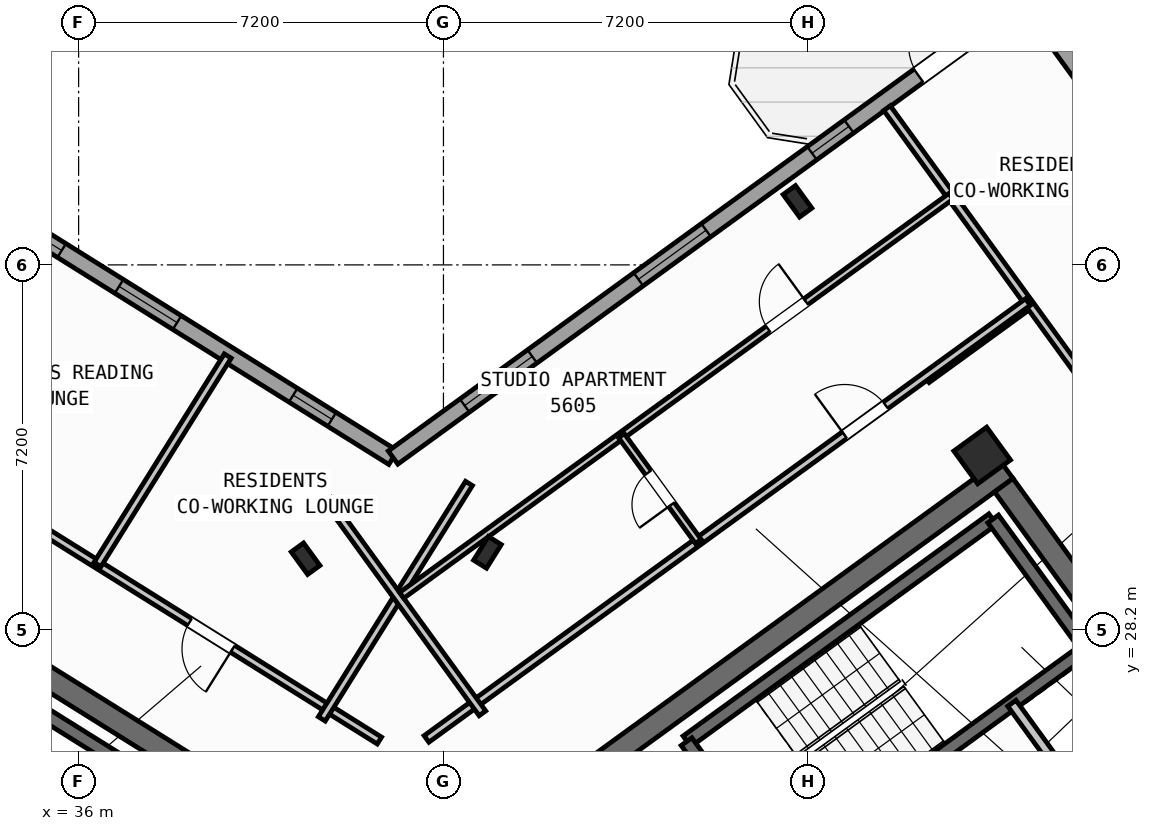
"""IFC4 building model, lengths in metres.
Left out: names, types, materials, properties, quantities, classifications, styles, units other than length and angle.
Written with IfcOpenShell. Run it as: python <this file> out.ifc"""

import sys

from ifc_helpers import new_model, si_unit, direction, frame, frame_2d, origin, origin_2d, place, context, subcontext, project, spatial, rectangle, hollow_rectangle, i_section, extrude, source, transform, mapped, element, fill, save


model = new_model("IFC4")
c1 = context("Model", 3, precision=1e-05, world=origin(), true_north=direction((0.0, 1.0)))
c2 = subcontext(c1, "Body", "Model", "MODEL_VIEW")
j1 = project(units=[si_unit("LENGTHUNIT", "METRE"), si_unit("PLANEANGLEUNIT", "RADIAN")], contexts=[c1])
p1 = place(None, origin())
s1 = spatial("IfcSite", under=j1, at=p1, CompositionType="ELEMENT")
p2 = place(p1, origin())
s2 = spatial("IfcBuilding", under=s1, at=p2, CompositionType="ELEMENT")
p3 = place(p2, frame((0.0, 0.0, 222.0)))
s3 = spatial("IfcBuildingStorey", under=s2, at=p3, CompositionType="ELEMENT", Elevation=222.0)
p4 = place(p3, frame((40.531, 24.036, 0.0), z_axis=(0.0, 0.0, 1.0), x_axis=(-0.848048787466, 0.529918157905, 0.0)))
e1 = element("IfcWall", 1, at=p4, inside=s3, PredefinedType="SHEAR", context=c2, shape_type="SweptSolid", body=[
    extrude(rectangle(XDim=13.04, YDim=0.45, at=frame_2d((6.52, 0.0))), origin(), (0.0, 0.0, 1.0), 3.35),
])
p5 = place(p3, frame((44.406, 24.172, 0.0), z_axis=(0.0, 0.0, 1.0), x_axis=(0.809012867805, 0.587790931986, 0.0)))
e2 = element("IfcWall", 2, at=p5, inside=s3, PredefinedType="SHEAR", context=c2, shape_type="SweptSolid", body=[
    extrude(rectangle(XDim=12.24, YDim=0.45, at=frame_2d((6.12, 0.0))), origin(), (0.0, 0.0, 1.0), 3.35),
])
p6 = place(p3, frame((58.064, 25.813, 0.0), z_axis=(0.0, 0.0, 1.0), x_axis=(-0.587774812919, 0.809024578921, 0.0)))
e3 = element("IfcWall", 3, at=p6, inside=s3, PredefinedType="SHEAR", context=c2, shape_type="SweptSolid", body=[
    extrude(rectangle(XDim=6.475, YDim=0.45, at=frame_2d((3.238, 0.0))), origin(), (0.0, 0.0, 1.0), 3.35),
])
m1 = source(origin(), c2, "Body", "SweptSolid", [
    extrude(i_section(OverallWidth=0.3, OverallDepth=0.55, WebThickness=0.015, FlangeThickness=0.029, at=origin_2d()), origin(), (0.0, 0.0, 1.0), 3.6),
])
for number, where, z_axis, x_axis in (
    (4, (44.068, 29.726, 0.0), (0.0, 0.0, 1.0), (-0.848, 0.53, 0.0)),
    (5, (40.479, 29.601, 0.0), (0.0, 0.0, 1.0), (0.809, 0.588, 0.0)),
):
    element("IfcColumn", number, at=place(p3, frame(where, z_axis=z_axis, x_axis=x_axis)), inside=s3, PredefinedType="COLUMN", context=c2, shape_type="MappedRepresentation", body=[
        mapped(m1, transform((0.0, 0.0, 0.0), scale=1.0)),
    ])
m2 = source(origin(), c2, "Body", "SweptSolid", [
    extrude(hollow_rectangle(XDim=0.8, YDim=0.8, WallThickness=0.032, at=origin_2d()), origin(), (0.0, 0.0, 1.0), 3.6),
])
p7 = place(p3, frame((53.832, 31.638, 0.0), z_axis=(0.0, 0.0, 1.0), x_axis=(0.809016994375, 0.587785252292, 0.0)))
e6 = element("IfcColumn", 6, at=p7, inside=s3, PredefinedType="COLUMN", context=c2, shape_type="MappedRepresentation", body=[
    mapped(m2, transform((0.0, 0.0, 0.0), scale=1.0)),
])
p8 = place(p3, frame((50.188, 36.654, 0.0), z_axis=(0.0, 0.0, 1.0), x_axis=(0.809016994375, 0.587785252292, 0.0)))
e7 = element("IfcColumn", 7, at=p8, inside=s3, PredefinedType="COLUMN", context=c2, shape_type="MappedRepresentation", body=[
    mapped(m1, transform((0.0, 0.0, 0.0), scale=1.0)),
])
p9 = place(p3, frame((17.424, 47.083, 0.0), z_axis=(0.0, 0.0, 1.0), x_axis=(0.848049927979, -0.529916332693, 0.0)))
e8 = element("IfcWall", 8, at=p9, inside=s3, PredefinedType="STANDARD", context=c2, shape_type="SweptSolid", body=[
    extrude(rectangle(XDim=29.223, YDim=0.32, at=frame_2d((14.612, 0.0))), origin(), (0.0, 0.0, 1.0), 3.35),
])
p10 = place(p9, frame((3.77, 0.0, 0.0)))
e9 = element("IfcOpeningElement", 9, at=p10, cuts=e8, PredefinedType="OPENING", context=c2, shape_type="SweptSolid", body=[
    extrude(rectangle(XDim=1.05, YDim=2.15, at=frame_2d((0.525, 1.075))), frame((0.0, 0.17, 0.0), z_axis=(0.0, -1.0, 0.0), x_axis=(1.0, 0.0, 0.0)), (0.0, 0.0, 1.0), 0.34),
])
p11 = place(p9, frame((1.125, 0.0, 0.9)))
e10 = element("IfcOpeningElement", 10, at=p11, cuts=e8, PredefinedType="OPENING", context=c2, shape_type="SweptSolid", body=[
    extrude(rectangle(XDim=1.65, YDim=1.45, at=frame_2d((0.825, 0.725))), frame((0.0, 0.17, 0.0), z_axis=(0.0, -1.0, 0.0), x_axis=(1.0, 0.0, 0.0)), (0.0, 0.0, 1.0), 0.34),
])
p12 = place(p9, frame((7.384, 0.0, 0.9)))
e11 = element("IfcOpeningElement", 11, at=p12, cuts=e8, PredefinedType="OPENING", context=c2, shape_type="SweptSolid", body=[
    extrude(rectangle(XDim=1.35, YDim=1.45, at=frame_2d((0.675, 0.725))), frame((0.0, 0.17, 0.0), z_axis=(0.0, -1.0, 0.0), x_axis=(1.0, 0.0, 0.0)), (0.0, 0.0, 1.0), 0.34),
])
p13 = place(p9, frame((10.054, 0.0, 0.9)))
e12 = element("IfcOpeningElement", 12, at=p13, cuts=e8, PredefinedType="OPENING", context=c2, shape_type="SweptSolid", body=[
    extrude(rectangle(XDim=1.35, YDim=1.45, at=frame_2d((0.675, 0.725))), frame((0.0, 0.17, 0.0), z_axis=(0.0, -1.0, 0.0), x_axis=(1.0, 0.0, 0.0)), (0.0, 0.0, 1.0), 0.34),
])
p14 = place(p9, frame((14.039, 0.0, 1.0)))
e13 = element("IfcOpeningElement", 13, at=p14, cuts=e8, PredefinedType="OPENING", context=c2, shape_type="SweptSolid", body=[
    extrude(rectangle(XDim=0.9, YDim=1.25, at=frame_2d((0.45, 0.625))), frame((0.0, 0.17, 0.0), z_axis=(0.0, -1.0, 0.0), x_axis=(1.0, 0.0, 0.0)), (0.0, 0.0, 1.0), 0.34),
])
p15 = place(p9, frame((17.254, 0.0, 1.0)))
e14 = element("IfcOpeningElement", 14, at=p15, cuts=e8, PredefinedType="OPENING", context=c2, shape_type="SweptSolid", body=[
    extrude(rectangle(XDim=0.9, YDim=1.25, at=frame_2d((0.45, 0.625))), frame((0.0, 0.17, 0.0), z_axis=(0.0, -1.0, 0.0), x_axis=(1.0, 0.0, 0.0)), (0.0, 0.0, 1.0), 0.34),
])
p16 = place(p9, frame((20.161, 0.0, 0.9)))
e15 = element("IfcOpeningElement", 15, at=p16, cuts=e8, PredefinedType="OPENING", context=c2, shape_type="SweptSolid", body=[
    extrude(rectangle(XDim=1.35, YDim=1.45, at=frame_2d((0.675, 0.725))), frame((0.0, 0.17, 0.0), z_axis=(0.0, -1.0, 0.0), x_axis=(1.0, 0.0, 0.0)), (0.0, 0.0, 1.0), 0.34),
])
p17 = place(p9, frame((22.846, 0.0, 0.9)))
e16 = element("IfcOpeningElement", 16, at=p17, cuts=e8, PredefinedType="OPENING", context=c2, shape_type="SweptSolid", body=[
    extrude(rectangle(XDim=1.35, YDim=1.45, at=frame_2d((0.675, 0.725))), frame((0.0, 0.17, 0.0), z_axis=(0.0, -1.0, 0.0), x_axis=(1.0, 0.0, 0.0)), (0.0, 0.0, 1.0), 0.34),
])
p18 = place(p9, frame((26.898, 0.0, 1.0)))
e17 = element("IfcOpeningElement", 17, at=p18, cuts=e8, PredefinedType="OPENING", context=c2, shape_type="SweptSolid", body=[
    extrude(rectangle(XDim=0.9, YDim=1.25, at=frame_2d((0.45, 0.625))), frame((0.0, 0.17, 0.0), z_axis=(0.0, -1.0, 0.0), x_axis=(1.0, 0.0, 0.0)), (0.0, 0.0, 1.0), 0.34),
])
p19 = place(p3, frame((42.207, 31.597, 0.0), z_axis=(0.0, 0.0, 1.0), x_axis=(0.809020333377, 0.587780656523, 0.0)))
e18 = element("IfcWall", 18, at=p19, inside=s3, PredefinedType="STANDARD", context=c2, shape_type="SweptSolid", body=[
    extrude(rectangle(XDim=15.223, YDim=0.32, at=frame_2d((7.611, 0.0))), origin(), (0.0, 0.0, 1.0), 3.35),
])
p20 = place(p19, frame((12.82, 0.0, 0.0)))
e19 = element("IfcOpeningElement", 19, at=p20, cuts=e18, PredefinedType="OPENING", context=c2, shape_type="SweptSolid", body=[
    extrude(rectangle(XDim=1.05, YDim=2.15, at=frame_2d((0.525, 1.075))), frame((0.0, 0.17, 0.0), z_axis=(0.0, -1.0, 0.0), x_axis=(1.0, 0.0, 0.0)), (0.0, 0.0, 1.0), 0.34),
])
p21 = place(p19, frame((1.745, 0.0, 0.9)))
e20 = element("IfcOpeningElement", 20, at=p21, cuts=e18, PredefinedType="OPENING", context=c2, shape_type="SweptSolid", body=[
    extrude(rectangle(XDim=1.65, YDim=1.45, at=frame_2d((0.825, 0.725))), frame((0.0, 0.17, 0.0), z_axis=(0.0, -1.0, 0.0), x_axis=(1.0, 0.0, 0.0)), (0.0, 0.0, 1.0), 0.34),
])
p22 = place(p19, frame((5.985, 0.0, 0.9)))
e21 = element("IfcOpeningElement", 21, at=p22, cuts=e18, PredefinedType="OPENING", context=c2, shape_type="SweptSolid", body=[
    extrude(rectangle(XDim=1.65, YDim=1.45, at=frame_2d((0.825, 0.725))), frame((0.0, 0.17, 0.0), z_axis=(0.0, -1.0, 0.0), x_axis=(1.0, 0.0, 0.0)), (0.0, 0.0, 1.0), 0.34),
])
p23 = place(p19, frame((10.219, 0.0, 1.0)))
e22 = element("IfcOpeningElement", 22, at=p23, cuts=e18, PredefinedType="OPENING", context=c2, shape_type="SweptSolid", body=[
    extrude(rectangle(XDim=0.9, YDim=1.25, at=frame_2d((0.45, 0.625))), frame((0.0, 0.17, 0.0), z_axis=(0.0, -1.0, 0.0), x_axis=(1.0, 0.0, 0.0)), (0.0, 0.0, 1.0), 0.34),
])
p24 = place(p3, frame((54.81, 40.5, 0.0), z_axis=(0.0, 0.0, 1.0), x_axis=(0.587783625747, -0.809018176127, 0.0)))
e23 = element("IfcWall", 23, at=p24, inside=s3, PredefinedType="STANDARD", context=c2, shape_type="SweptSolid", body=[
    extrude(rectangle(XDim=21.587, YDim=0.32, at=frame_2d((10.794, 0.0))), origin(), (0.0, 0.0, 1.0), 2.825),
])
p25 = place(p24, frame((2.606, 0.0, 0.9)))
e24 = element("IfcOpeningElement", 24, at=p25, cuts=e23, PredefinedType="OPENING", context=c2, shape_type="SweptSolid", body=[
    extrude(rectangle(XDim=1.65, YDim=1.45, at=frame_2d((0.825, 0.725))), frame((0.0, 0.17, 0.0), z_axis=(0.0, -1.0, 0.0), x_axis=(1.0, 0.0, 0.0)), (0.0, 0.0, 1.0), 0.34),
])
p26 = place(p24, frame((11.184, 0.0, 0.9)))
e25 = element("IfcOpeningElement", 25, at=p26, cuts=e23, PredefinedType="OPENING", context=c2, shape_type="SweptSolid", body=[
    extrude(rectangle(XDim=1.35, YDim=1.45, at=frame_2d((0.675, 0.725))), frame((0.0, 0.17, 0.0), z_axis=(0.0, -1.0, 0.0), x_axis=(1.0, 0.0, 0.0)), (0.0, 0.0, 1.0), 0.34),
])
p27 = place(p24, frame((15.202, 0.0, 1.0)))
e26 = element("IfcOpeningElement", 26, at=p27, cuts=e23, PredefinedType="OPENING", context=c2, shape_type="SweptSolid", body=[
    extrude(rectangle(XDim=0.9, YDim=1.25, at=frame_2d((0.45, 0.625))), frame((0.0, 0.17, 0.0), z_axis=(0.0, -1.0, 0.0), x_axis=(1.0, 0.0, 0.0)), (0.0, 0.0, 1.0), 0.34),
])
p28 = place(p24, frame((18.607, 0.0, 1.0)))
e27 = element("IfcOpeningElement", 27, at=p28, cuts=e23, PredefinedType="OPENING", context=c2, shape_type="SweptSolid", body=[
    extrude(rectangle(XDim=0.9, YDim=1.25, at=frame_2d((0.45, 0.625))), frame((0.0, 0.17, 0.0), z_axis=(0.0, -1.0, 0.0), x_axis=(1.0, 0.0, 0.0)), (0.0, 0.0, 1.0), 0.34),
])
p29 = place(p3, frame((39.721, 23.788, 0.0), z_axis=(0.0, 0.0, 1.0), x_axis=(-0.848054434086, 0.529909121291, 0.0)))
e28 = element("IfcWall", 28, at=p29, inside=s3, PredefinedType="SHEAR", context=c2, shape_type="SweptSolid", body=[
    extrude(rectangle(XDim=7.33, YDim=0.26, at=frame_2d((3.665, 0.0))), origin(), (0.0, 0.0, 1.0), 3.35),
])
p30 = place(p3, frame((48.006, 25.996, 0.0), z_axis=(0.0, 0.0, 1.0), x_axis=(0.80901903764, 0.587782439969, 0.0)))
e29 = element("IfcWall", 29, at=p30, inside=s3, PredefinedType="SHEAR", context=c2, shape_type="SweptSolid", body=[
    extrude(rectangle(XDim=7.46, YDim=0.26, at=frame_2d((3.73, 0.0))), origin(), (0.0, 0.0, 1.0), 3.35),
])
p31 = place(p3, frame((49.863, 23.44, 0.0), z_axis=(0.0, 0.0, 1.0), x_axis=(0.809003474932, 0.587803859759, 0.0)))
e30 = element("IfcWall", 30, at=p31, inside=s3, PredefinedType="SHEAR", context=c2, shape_type="SweptSolid", body=[
    extrude(rectangle(XDim=7.46, YDim=0.26, at=frame_2d((3.73, 0.0))), origin(), (0.0, 0.0, 1.0), 3.35),
])
p32 = place(p31, frame((0.36, 0.0, 0.0)))
e31 = element("IfcOpeningElement", 31, at=p32, cuts=e30, PredefinedType="OPENING", context=c2, shape_type="SweptSolid", body=[
    extrude(rectangle(XDim=0.86, YDim=2.05, at=frame_2d((0.43, 1.025))), frame((0.0, 0.14, 0.0), z_axis=(0.0, -1.0, 0.0), x_axis=(1.0, 0.0, 0.0)), (0.0, 0.0, 1.0), 0.28),
])
p33 = place(p3, frame((49.855, 23.434, 0.0), z_axis=(0.0, 0.0, 1.0), x_axis=(-0.58776738483, 0.809029975545, 0.0)))
e32 = element("IfcWall", 32, at=p33, inside=s3, PredefinedType="SHEAR", context=c2, shape_type="SweptSolid", body=[
    extrude(rectangle(XDim=3.16, YDim=0.26, at=frame_2d((1.58, 0.0))), origin(), (0.0, 0.0, 1.0), 3.35),
])
p34 = place(p3, frame((55.906, 27.831, 0.0), z_axis=(0.0, 0.0, 1.0), x_axis=(-0.587804123638, 0.809003283204, 0.0)))
e33 = element("IfcWall", 33, at=p34, inside=s3, PredefinedType="SHEAR", context=c2, shape_type="SweptSolid", body=[
    extrude(rectangle(XDim=3.16, YDim=0.26, at=frame_2d((1.58, 0.0))), origin(), (0.0, 0.0, 1.0), 3.35),
])
p35 = place(p3, frame((56.111, 24.419, 0.0), z_axis=(0.0, 0.0, 1.0), x_axis=(-0.58777848983, 0.809021907548, 0.0)))
e34 = element("IfcWall", 34, at=p35, inside=s3, PredefinedType="STANDARD", context=c2, shape_type="SweptSolid", body=[
    extrude(rectangle(XDim=2.88, YDim=0.2, at=frame_2d((1.44, 0.0))), origin(), (0.0, 0.0, 1.0), 3.34),
])
p36 = place(p3, frame((41.936, 26.012, 0.0), z_axis=(0.0, 0.0, 1.0), x_axis=(-0.848051154596, 0.529914369676, 0.0)))
e35 = element("IfcWall", 35, at=p36, inside=s3, PredefinedType="PARTITIONING", context=c2, shape_type="SweptSolid", body=[
    extrude(rectangle(XDim=15.57, YDim=0.16, at=frame_2d((7.785, 0.0))), origin(), (0.0, 0.0, 1.0), 3.34),
])
p37 = place(p36, frame((3.415, 0.0, 0.0)))
e36 = element("IfcOpeningElement", 36, at=p37, cuts=e35, PredefinedType="OPENING", context=c2, shape_type="SweptSolid", body=[
    extrude(rectangle(XDim=1.0, YDim=2.1, at=frame_2d((0.5, 1.05))), frame((0.0, 0.09, 0.0), z_axis=(0.0, -1.0, 0.0), x_axis=(1.0, 0.0, 0.0)), (0.0, 0.0, 1.0), 0.18),
])
p38 = place(p36, frame((10.565, 0.0, 0.0)))
e37 = element("IfcOpeningElement", 37, at=p38, cuts=e35, PredefinedType="OPENING", context=c2, shape_type="SweptSolid", body=[
    extrude(rectangle(XDim=1.0, YDim=2.1, at=frame_2d((0.5, 1.05))), frame((0.0, 0.09, 0.0), z_axis=(0.0, -1.0, 0.0), x_axis=(1.0, 0.0, 0.0)), (0.0, 0.0, 1.0), 0.18),
])
p39 = place(p3, frame((43.704, 31.086, 0.0), z_axis=(0.0, 0.0, 1.0), x_axis=(-0.529906828443, -0.848055866774, 0.0)))
e38 = element("IfcWall", 38, at=p39, inside=s3, PredefinedType="PARTITIONING", context=c2, shape_type="SweptSolid", body=[
    extrude(rectangle(XDim=5.48, YDim=0.16, at=frame_2d((2.74, 0.0))), origin(), (0.0, 0.0, 1.0), 3.34),
])
p40 = place(p3, frame((38.943, 33.601, 0.0), z_axis=(0.0, 0.0, 1.0), x_axis=(-0.529949167559, -0.848029409752, 0.0)))
e39 = element("IfcWall", 39, at=p40, inside=s3, PredefinedType="PARTITIONING", context=c2, shape_type="SweptSolid", body=[
    extrude(rectangle(XDim=4.85, YDim=0.16, at=frame_2d((2.425, 0.0))), origin(), (0.0, 0.0, 1.0), 3.34),
])
p41 = place(p3, frame((52.739, 33.143, 0.0), z_axis=(0.0, 0.0, 1.0), x_axis=(0.809000999347, 0.58780726693, 0.0)))
e40 = element("IfcWall", 40, at=p41, inside=s3, PredefinedType="PARTITIONING", context=c2, shape_type="SweptSolid", body=[
    extrude(rectangle(XDim=2.51, YDim=0.16, at=frame_2d((1.255, 0.0))), origin(), (0.0, 0.0, 1.0), 3.34),
])
p42 = place(p3, frame((56.627, 32.062, 0.0), z_axis=(0.0, 0.0, 1.0), x_axis=(-0.587769918433, 0.809028134854, 0.0)))
e41 = element("IfcWall", 41, at=p42, inside=s3, PredefinedType="PARTITIONING", context=c2, shape_type="SweptSolid", body=[
    extrude(rectangle(XDim=7.95, YDim=0.16, at=frame_2d((3.975, 0.0))), origin(), (0.0, 0.0, 1.0), 3.34),
])
p43 = place(p3, frame((42.866, 26.044, 0.0), z_axis=(0.0, 0.0, 1.0), x_axis=(0.809020254154, 0.587780765566, 0.0)))
e42 = element("IfcWall", 42, at=p43, inside=s3, PredefinedType="PARTITIONING", context=c2, shape_type="SweptSolid", body=[
    extrude(rectangle(XDim=14.67, YDim=0.16, at=frame_2d((7.335, 0.0))), origin(), (0.0, 0.0, 1.0), 3.34),
])
p44 = place(p43, frame((10.2, 0.0, 0.0)))
e43 = element("IfcOpeningElement", 43, at=p44, cuts=e42, PredefinedType="OPENING", context=c2, shape_type="SweptSolid", body=[
    extrude(rectangle(XDim=1.0, YDim=2.1, at=frame_2d((0.5, 1.05))), frame((0.0, 0.09, 0.0), z_axis=(0.0, -1.0, 0.0), x_axis=(1.0, 0.0, 0.0)), (0.0, 0.0, 1.0), 0.18),
])
p45 = place(p3, frame((43.969, 26.55, 0.0), z_axis=(0.0, 0.0, 1.0), x_axis=(-0.587776919386, 0.80902304852, 0.0)))
e44 = element("IfcWall", 44, at=p45, inside=s3, PredefinedType="PARTITIONING", context=c2, shape_type="SweptSolid", body=[
    extrude(rectangle(XDim=5.48, YDim=0.16, at=frame_2d((2.74, 0.0))), origin(), (0.0, 0.0, 1.0), 3.34),
])
p46 = place(p3, frame((42.377, 28.878, 0.0), z_axis=(0.0, 0.0, 1.0), x_axis=(0.809020411523, 0.587780548963, 0.0)))
e45 = element("IfcWall", 45, at=p46, inside=s3, PredefinedType="PLUMBINGWALL", context=c2, shape_type="SweptSolid", body=[
    extrude(rectangle(XDim=13.4, YDim=0.14, at=frame_2d((6.7, 0.0))), origin(), (0.0, 0.0, 1.0), 3.34),
])
p47 = place(p46, frame((8.94, 0.0, 0.0)))
e46 = element("IfcOpeningElement", 46, at=p47, cuts=e45, PredefinedType="OPENING", context=c2, shape_type="SweptSolid", body=[
    extrude(rectangle(XDim=0.92, YDim=2.08, at=frame_2d((0.46, 1.04))), frame((0.0, 0.08, 0.0), z_axis=(0.0, -1.0, 0.0), x_axis=(1.0, 0.0, 0.0)), (0.0, 0.0, 1.0), 0.16),
])
p48 = place(p3, frame((48.229, 29.941, 0.0), z_axis=(0.0, 0.0, 1.0), x_axis=(-0.587772116736, 0.809026537752, 0.0)))
e47 = element("IfcWall", 47, at=p48, inside=s3, PredefinedType="PLUMBINGWALL", context=c2, shape_type="SweptSolid", body=[
    extrude(rectangle(XDim=2.58, YDim=0.14, at=frame_2d((1.29, 0.0))), origin(), (0.0, 0.0, 1.0), 3.34),
])
p49 = place(p48, frame((0.9, 0.0, 0.0)))
e48 = element("IfcOpeningElement", 48, at=p49, cuts=e47, PredefinedType="OPENING", context=c2, shape_type="SweptSolid", body=[
    extrude(rectangle(XDim=0.78, YDim=2.05, at=frame_2d((0.39, 1.025))), frame((0.0, 0.08, 0.0), z_axis=(0.0, -1.0, 0.0), x_axis=(1.0, 0.0, 0.0)), (0.0, 0.0, 1.0), 0.16),
])
m3 = source(origin(), c2, "Body", "SweptSolid", [
    extrude(rectangle(XDim=1.05, YDim=2.15, at=frame_2d((0.525, 1.075))), frame((0.0, 0.025, 0.0), z_axis=(0.0, -1.0, 0.0), x_axis=(1.0, 0.0, 0.0)), (0.0, 0.0, 1.0), 0.05),
])
p50 = place(p20, origin())
e49 = element("IfcDoor", 49, at=p50, inside=s3, OperationType="SINGLE_SWING_RIGHT", PredefinedType="DOOR", context=c2, shape_type="MappedRepresentation", body=[
    mapped(m3, transform((0.0, 0.0, 0.0), scale=1.0)),
])
fill(e19, e49)
m4 = source(origin(), c2, "Body", "SweptSolid", [
    extrude(rectangle(XDim=1.35, YDim=1.45, at=frame_2d((0.675, 0.725))), frame((0.0, 0.03, 0.0), z_axis=(0.0, -1.0, 0.0), x_axis=(1.0, 0.0, 0.0)), (0.0, 0.0, 1.0), 0.06),
])
p51 = place(p16, origin())
e50 = element("IfcWindow", 50, at=p51, inside=s3, PartitioningType="SINGLE_PANEL", PredefinedType="WINDOW", context=c2, shape_type="MappedRepresentation", body=[
    mapped(m4, transform((0.0, 0.0, 0.0), scale=1.0)),
])
fill(e15, e50)
p52 = place(p17, origin())
e51 = element("IfcWindow", 51, at=p52, inside=s3, PartitioningType="SINGLE_PANEL", PredefinedType="WINDOW", context=c2, shape_type="MappedRepresentation", body=[
    mapped(m4, transform((0.0, 0.0, 0.0), scale=1.0)),
])
fill(e16, e51)
m5 = source(origin(), c2, "Body", "SweptSolid", [
    extrude(rectangle(XDim=0.9, YDim=1.25, at=frame_2d((0.45, 0.625))), frame((0.0, 0.03, 0.0), z_axis=(0.0, -1.0, 0.0), x_axis=(1.0, 0.0, 0.0)), (0.0, 0.0, 1.0), 0.06),
])
p53 = place(p18, origin())
e52 = element("IfcWindow", 52, at=p53, inside=s3, PartitioningType="SINGLE_PANEL", PredefinedType="WINDOW", context=c2, shape_type="MappedRepresentation", body=[
    mapped(m5, transform((0.0, 0.0, 0.0), scale=1.0)),
])
fill(e17, e52)
m6 = source(origin(), c2, "Body", "SweptSolid", [
    extrude(rectangle(XDim=1.65, YDim=1.45, at=frame_2d((0.825, 0.725))), frame((0.0, 0.03, 0.0), z_axis=(0.0, -1.0, 0.0), x_axis=(1.0, 0.0, 0.0)), (0.0, 0.0, 1.0), 0.06),
])
p54 = place(p21, origin())
e53 = element("IfcWindow", 53, at=p54, inside=s3, PartitioningType="SINGLE_PANEL", PredefinedType="WINDOW", context=c2, shape_type="MappedRepresentation", body=[
    mapped(m6, transform((0.0, 0.0, 0.0), scale=1.0)),
])
fill(e20, e53)
p55 = place(p22, origin())
e54 = element("IfcWindow", 54, at=p55, inside=s3, PartitioningType="SINGLE_PANEL", PredefinedType="WINDOW", context=c2, shape_type="MappedRepresentation", body=[
    mapped(m6, transform((0.0, 0.0, 0.0), scale=1.0)),
])
fill(e21, e54)
p56 = place(p23, origin())
e55 = element("IfcWindow", 55, at=p56, inside=s3, PartitioningType="SINGLE_PANEL", PredefinedType="WINDOW", context=c2, shape_type="MappedRepresentation", body=[
    mapped(m5, transform((0.0, 0.0, 0.0), scale=1.0)),
])
fill(e22, e55)
m7 = source(origin(), c2, "Body", "SweptSolid", [
    extrude(rectangle(XDim=1.0, YDim=2.1, at=frame_2d((0.5, 1.05))), frame((0.0, 0.025, 0.0), z_axis=(0.0, -1.0, 0.0), x_axis=(1.0, 0.0, 0.0)), (0.0, 0.0, 1.0), 0.05),
])
p57 = place(p37, origin())
e56 = element("IfcDoor", 56, at=p57, inside=s3, OperationType="SINGLE_SWING_LEFT", PredefinedType="DOOR", context=c2, shape_type="MappedRepresentation", body=[
    mapped(m7, transform((0.0, 0.0, 0.0), scale=1.0)),
])
fill(e36, e56)
p58 = place(p44, origin())
e57 = element("IfcDoor", 57, at=p58, inside=s3, OperationType="SINGLE_SWING_LEFT", PredefinedType="DOOR", context=c2, shape_type="MappedRepresentation", body=[
    mapped(m7, transform((0.0, 0.0, 0.0), scale=1.0)),
])
fill(e43, e57)
m8 = source(origin(), c2, "Body", "SweptSolid", [
    extrude(rectangle(XDim=0.92, YDim=2.08, at=frame_2d((0.46, 1.04))), frame((0.0, 0.025, 0.0), z_axis=(0.0, -1.0, 0.0), x_axis=(1.0, 0.0, 0.0)), (0.0, 0.0, 1.0), 0.05),
])
p59 = place(p47, origin())
e58 = element("IfcDoor", 58, at=p59, inside=s3, OperationType="SINGLE_SWING_RIGHT", PredefinedType="DOOR", context=c2, shape_type="MappedRepresentation", body=[
    mapped(m8, transform((0.0, 0.0, 0.0), scale=1.0)),
])
fill(e46, e58)
m9 = source(origin(), c2, "Body", "SweptSolid", [
    extrude(rectangle(XDim=0.78, YDim=2.05, at=frame_2d((0.39, 1.025))), frame((0.0, 0.025, 0.0), z_axis=(0.0, -1.0, 0.0), x_axis=(1.0, 0.0, 0.0)), (0.0, 0.0, 1.0), 0.05),
])
p60 = place(p49, origin())
e59 = element("IfcDoor", 59, at=p60, inside=s3, OperationType="SINGLE_SWING_LEFT", PredefinedType="DOOR", context=c2, shape_type="MappedRepresentation", body=[
    mapped(m9, transform((0.0, 0.0, 0.0), scale=1.0)),
])
fill(e48, e59)
save(model, sys.argv[1])
